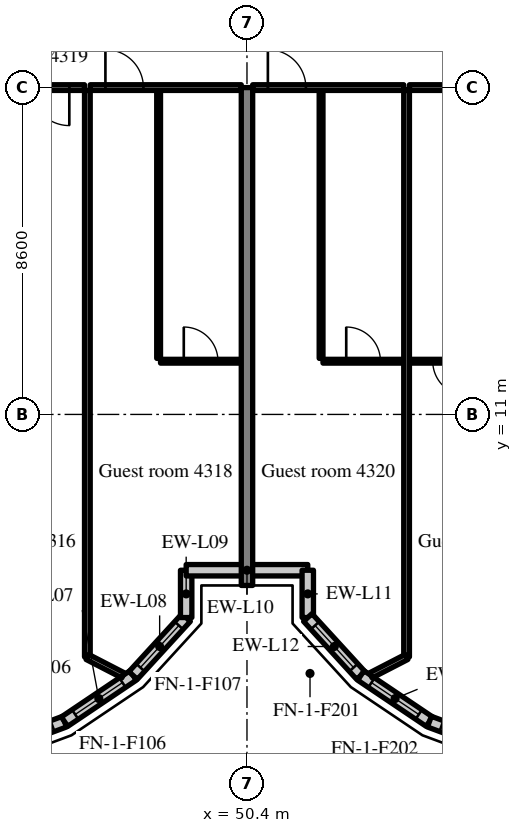
"""IFC4 building model, lengths in metres.
Left out: names, types, materials, properties, quantities, classifications, styles, units other than length and angle.
Written with IfcOpenShell. Run it as: python <this file> out.ifc"""

import sys

from ifc_helpers import new_model, si_unit, direction, frame, frame_2d, origin, place, context, subcontext, project, spatial, rectangle, extrude, source, transform, mapped, element, fill, save


model = new_model("IFC4")
c1 = context("Model", 3, precision=1e-05, world=origin(), true_north=direction((0.0, 1.0)))
c2 = subcontext(c1, "Body", "Model", "MODEL_VIEW")
j1 = project(units=[si_unit("LENGTHUNIT", "METRE"), si_unit("PLANEANGLEUNIT", "RADIAN")], contexts=[c1])
p1 = place(None, origin())
s1 = spatial("IfcSite", under=j1, at=p1, CompositionType="ELEMENT")
p2 = place(p1, origin())
s2 = spatial("IfcBuilding", under=s1, at=p2, CompositionType="ELEMENT")
p3 = place(p2, frame((0.0, 0.0, 178.2)))
s3 = spatial("IfcBuildingStorey", under=s2, at=p3, CompositionType="ELEMENT", Elevation=178.2)
m1 = source(origin(), c2, "Body", "SweptSolid", [
    extrude(rectangle(XDim=13.1, YDim=0.3, at=frame_2d((6.55, 0.0))), origin(), (0.0, 0.0, 1.0), 3.52),
])
p4 = place(p3, frame((50.4, 6.5, 0.0), z_axis=(0.0, 0.0, 1.0), x_axis=(0.0, 1.0, 0.0)))
e1 = element("IfcWall", 1, at=p4, inside=s3, PredefinedType="SHEAR", context=c2, shape_type="MappedRepresentation", body=[
    mapped(m1, transform((0.0, 0.0, 0.0), scale=1.0)),
])
m2 = source(origin(), c2, "Body", "SweptSolid", [
    extrude(rectangle(XDim=2.176, YDim=0.3, at=frame_2d((1.088, 0.0))), origin(), (0.0, 0.0, 1.0), 3.52),
])
p5 = place(p3, frame((43.56, 2.16, 0.0), z_axis=(0.0, 0.0, 1.0), x_axis=(0.937531979054, 0.347899106424, 0.0)))
e2 = element("IfcWall", 2, at=p5, inside=s3, PredefinedType="SOLIDWALL", context=c2, shape_type="MappedRepresentation", body=[
    mapped(m2, transform((0.0, 0.0, 0.0), scale=1.0)),
])
m3 = source(origin(), c2, "Body", "SweptSolid", [
    extrude(rectangle(XDim=1.5, YDim=2.0, at=frame_2d((0.75, 1.0))), frame((0.0, 0.16, 0.0), z_axis=(0.0, -1.0, 0.0), x_axis=(1.0, 0.0, 0.0)), (0.0, 0.0, 1.0), 0.32),
])
p6 = place(p5, frame((0.338, 0.0, 0.9)))
e3 = element("IfcOpeningElement", 3, at=p6, cuts=e2, PredefinedType="OPENING", context=c2, shape_type="MappedRepresentation", body=[
    mapped(m3, transform((0.0, 0.0, 0.0), scale=1.0)),
])
m4 = source(origin(), c2, "Body", "SweptSolid", [
    extrude(rectangle(XDim=2.176, YDim=0.3, at=frame_2d((1.088, 0.0))), origin(), (0.0, 0.0, 1.0), 3.52),
])
p7 = place(p3, frame((45.599, 2.917, 0.0), z_axis=(0.0, 0.0, 1.0), x_axis=(0.829625727223, 0.558319937607, 0.0)))
e4 = element("IfcWall", 4, at=p7, inside=s3, PredefinedType="SOLIDWALL", context=c2, shape_type="MappedRepresentation", body=[
    mapped(m4, transform((0.0, 0.0, 0.0), scale=1.0)),
])
p8 = place(p7, frame((0.338, 0.0, 0.9)))
e5 = element("IfcOpeningElement", 5, at=p8, cuts=e4, PredefinedType="OPENING", context=c2, shape_type="MappedRepresentation", body=[
    mapped(m3, transform((0.0, 0.0, 0.0), scale=1.0)),
])
m5 = source(origin(), c2, "Body", "SweptSolid", [
    extrude(rectangle(XDim=2.067, YDim=0.3, at=frame_2d((1.033, 0.0))), origin(), (0.0, 0.0, 1.0), 3.52),
])
p9 = place(p3, frame((47.404, 4.131, 0.0), z_axis=(0.0, 0.0, 1.0), x_axis=(0.675355439877, 0.737492393065, 0.0)))
e6 = element("IfcWall", 6, at=p9, inside=s3, PredefinedType="SOLIDWALL", context=c2, shape_type="MappedRepresentation", body=[
    mapped(m5, transform((0.0, 0.0, 0.0), scale=1.0)),
])
p10 = place(p9, frame((0.283, 0.0, 0.9)))
e7 = element("IfcOpeningElement", 7, at=p10, cuts=e6, PredefinedType="OPENING", context=c2, shape_type="MappedRepresentation", body=[
    mapped(m3, transform((0.0, 0.0, 0.0), scale=1.0)),
])
m6 = source(origin(), c2, "Body", "SweptSolid", [
    extrude(rectangle(XDim=1.244, YDim=0.3, at=frame_2d((0.622, 0.0))), origin(), (0.0, 0.0, 1.0), 3.52),
])
p11 = place(p3, frame((48.8, 5.656, 0.0), z_axis=(0.0, 0.0, 1.0), x_axis=(0.0, 1.0, 0.0)))
e8 = element("IfcWall", 8, at=p11, inside=s3, PredefinedType="SOLIDWALL", context=c2, shape_type="MappedRepresentation", body=[
    mapped(m6, transform((0.0, 0.0, 0.0), scale=1.0)),
])
m7 = source(origin(), c2, "Body", "SweptSolid", [
    extrude(rectangle(XDim=3.2, YDim=0.3, at=frame_2d((1.6, 0.0))), origin(), (0.0, 0.0, 1.0), 3.52),
])
p12 = place(p3, frame((48.8, 6.9, 0.0), z_axis=(0.0, 0.0, 1.0), x_axis=(1.0, 0.0, 0.0)))
e9 = element("IfcWall", 9, at=p12, inside=s3, PredefinedType="SOLIDWALL", context=c2, shape_type="MappedRepresentation", body=[
    mapped(m7, transform((0.0, 0.0, 0.0), scale=1.0)),
])
p13 = place(p3, frame((52.0, 6.9, 0.0), z_axis=(0.0, 0.0, 1.0), x_axis=(0.0, -1.0, 0.0)))
e10 = element("IfcWall", 10, at=p13, inside=s3, PredefinedType="SOLIDWALL", context=c2, shape_type="MappedRepresentation", body=[
    mapped(m6, transform((0.0, 0.0, 0.0), scale=1.0)),
])
p14 = place(p3, frame((52.0, 5.656, 0.0), z_axis=(0.0, 0.0, 1.0), x_axis=(0.675355439877, -0.737492393065, 0.0)))
e11 = element("IfcWall", 11, at=p14, inside=s3, PredefinedType="SOLIDWALL", context=c2, shape_type="MappedRepresentation", body=[
    mapped(m5, transform((0.0, 0.0, 0.0), scale=1.0)),
])
p15 = place(p14, frame((0.283, 0.0, 0.9)))
e12 = element("IfcOpeningElement", 12, at=p15, cuts=e11, PredefinedType="OPENING", context=c2, shape_type="MappedRepresentation", body=[
    mapped(m3, transform((0.0, 0.0, 0.0), scale=1.0)),
])
p16 = place(p3, frame((53.396, 4.131, 0.0), z_axis=(0.0, 0.0, 1.0), x_axis=(0.829590746428, -0.558371913192, 0.0)))
e13 = element("IfcWall", 13, at=p16, inside=s3, PredefinedType="SOLIDWALL", context=c2, shape_type="MappedRepresentation", body=[
    mapped(m4, transform((0.0, 0.0, 0.0), scale=1.0)),
])
p17 = place(p16, frame((0.338, 0.0, 0.9)))
e14 = element("IfcOpeningElement", 14, at=p17, cuts=e13, PredefinedType="OPENING", context=c2, shape_type="MappedRepresentation", body=[
    mapped(m3, transform((0.0, 0.0, 0.0), scale=1.0)),
])
p18 = place(p3, frame((55.201, 2.917, 0.0), z_axis=(0.0, 0.0, 1.0), x_axis=(0.93754555999, -0.347862505801, 0.0)))
e15 = element("IfcWall", 15, at=p18, inside=s3, PredefinedType="SOLIDWALL", context=c2, shape_type="MappedRepresentation", body=[
    mapped(m4, transform((0.0, 0.0, 0.0), scale=1.0)),
])
p19 = place(p18, frame((0.338, 0.0, 0.9)))
e16 = element("IfcOpeningElement", 16, at=p19, cuts=e15, PredefinedType="OPENING", context=c2, shape_type="MappedRepresentation", body=[
    mapped(m3, transform((0.0, 0.0, 0.0), scale=1.0)),
])
m8 = source(origin(), c2, "Body", "SweptSolid", [
    extrude(rectangle(XDim=3.975, YDim=0.15, at=frame_2d((1.988, 0.0))), origin(), (0.0, 0.0, 1.0), 2.82),
])
p20 = place(p3, frame((42.15, 19.6, 0.0), z_axis=(0.0, 0.0, 1.0), x_axis=(1.0, 0.0, 0.0)))
e17 = element("IfcWall", 17, at=p20, inside=s3, PredefinedType="PARTITIONING", context=c2, shape_type="MappedRepresentation", body=[
    mapped(m8, transform((0.0, 0.0, 0.0), scale=1.0)),
])
m9 = source(origin(), c2, "Body", "SweptSolid", [
    extrude(rectangle(XDim=1.0, YDim=2.1, at=frame_2d((0.5, 1.05))), frame((0.0, 0.085, 0.0), z_axis=(0.0, -1.0, 0.0), x_axis=(1.0, 0.0, 0.0)), (0.0, 0.0, 1.0), 0.17),
])
p21 = place(p20, frame((2.575, 0.0, 0.0)))
e18 = element("IfcOpeningElement", 18, at=p21, cuts=e17, PredefinedType="OPENING", context=c2, shape_type="MappedRepresentation", body=[
    mapped(m9, transform((0.0, 0.0, 0.0), scale=1.0)),
])
m10 = source(origin(), c2, "Body", "SweptSolid", [
    extrude(rectangle(XDim=7.05, YDim=0.1, at=frame_2d((3.525, 0.0))), origin(), (0.0, 0.0, 1.0), 3.52),
])
p22 = place(p3, frame((48.075, 12.475, 0.0), z_axis=(0.0, 0.0, 1.0), x_axis=(0.0, 1.0, 0.0)))
e19 = element("IfcWall", 19, at=p22, inside=s3, PredefinedType="PARTITIONING", context=c2, shape_type="MappedRepresentation", body=[
    mapped(m10, transform((0.0, 0.0, 0.0), scale=1.0)),
])
m11 = source(origin(), c2, "Body", "SweptSolid", [
    extrude(rectangle(XDim=2.125, YDim=0.1, at=frame_2d((1.062, 0.0))), origin(), (0.0, 0.0, 1.0), 3.52),
])
p23 = place(p3, frame((48.125, 12.4, 0.0), z_axis=(0.0, 0.0, 1.0), x_axis=(1.0, 0.0, 0.0)))
e20 = element("IfcWall", 20, at=p23, inside=s3, PredefinedType="PARTITIONING", context=c2, shape_type="MappedRepresentation", body=[
    mapped(m11, transform((0.0, 0.0, 0.0), scale=1.0)),
])
m12 = source(origin(), c2, "Body", "SweptSolid", [
    extrude(rectangle(XDim=0.9, YDim=2.1, at=frame_2d((0.45, 1.05))), frame((0.0, 0.06, 0.0), z_axis=(0.0, -1.0, 0.0), x_axis=(1.0, 0.0, 0.0)), (0.0, 0.0, 1.0), 0.12),
])
p24 = place(p23, frame((0.612, 0.0, 0.0)))
e21 = element("IfcOpeningElement", 21, at=p24, cuts=e20, PredefinedType="OPENING", context=c2, shape_type="MappedRepresentation", body=[
    mapped(m12, transform((0.0, 0.0, 0.0), scale=1.0)),
])
p25 = place(p3, frame((46.275, 19.6, 0.0), z_axis=(0.0, 0.0, 1.0), x_axis=(1.0, 0.0, 0.0)))
e22 = element("IfcWall", 22, at=p25, inside=s3, PredefinedType="PARTITIONING", context=c2, shape_type="MappedRepresentation", body=[
    mapped(m8, transform((0.0, 0.0, 0.0), scale=1.0)),
])
p26 = place(p25, frame((0.4, 0.0, 0.0)))
e23 = element("IfcOpeningElement", 23, at=p26, cuts=e22, PredefinedType="OPENING", context=c2, shape_type="MappedRepresentation", body=[
    mapped(m9, transform((0.0, 0.0, 0.0), scale=1.0)),
])
m13 = source(origin(), c2, "Body", "SweptSolid", [
    extrude(rectangle(XDim=14.906, YDim=0.15, at=frame_2d((7.453, 0.0))), origin(), (0.0, 0.0, 1.0), 3.52),
])
p27 = place(p3, frame((46.2, 4.619, 0.0), z_axis=(0.0, 0.0, 1.0), x_axis=(0.0, 1.0, 0.0)))
e24 = element("IfcWall", 24, at=p27, inside=s3, PredefinedType="PARTITIONING", context=c2, shape_type="MappedRepresentation", body=[
    mapped(m13, transform((0.0, 0.0, 0.0), scale=1.0)),
])
p28 = place(p3, frame((52.35, 12.475, 0.0), z_axis=(0.0, 0.0, 1.0), x_axis=(0.0, 1.0, 0.0)))
e25 = element("IfcWall", 25, at=p28, inside=s3, PredefinedType="PARTITIONING", context=c2, shape_type="MappedRepresentation", body=[
    mapped(m10, transform((0.0, 0.0, 0.0), scale=1.0)),
])
p29 = place(p3, frame((52.4, 12.4, 0.0), z_axis=(0.0, 0.0, 1.0), x_axis=(1.0, 0.0, 0.0)))
e26 = element("IfcWall", 26, at=p29, inside=s3, PredefinedType="PARTITIONING", context=c2, shape_type="MappedRepresentation", body=[
    mapped(m11, transform((0.0, 0.0, 0.0), scale=1.0)),
])
p30 = place(p29, frame((0.612, 0.0, 0.0)))
e27 = element("IfcOpeningElement", 27, at=p30, cuts=e26, PredefinedType="OPENING", context=c2, shape_type="MappedRepresentation", body=[
    mapped(m12, transform((0.0, 0.0, 0.0), scale=1.0)),
])
m14 = source(origin(), c2, "Body", "SweptSolid", [
    extrude(rectangle(XDim=3.975, YDim=0.15, at=frame_2d((1.987, 0.0))), origin(), (0.0, 0.0, 1.0), 2.82),
])
p31 = place(p3, frame((50.55, 19.6, 0.0), z_axis=(0.0, 0.0, 1.0), x_axis=(1.0, 0.0, 0.0)))
e28 = element("IfcWall", 28, at=p31, inside=s3, PredefinedType="PARTITIONING", context=c2, shape_type="MappedRepresentation", body=[
    mapped(m14, transform((0.0, 0.0, 0.0), scale=1.0)),
])
p32 = place(p31, frame((0.4, 0.0, 0.0)))
e29 = element("IfcOpeningElement", 29, at=p32, cuts=e28, PredefinedType="OPENING", context=c2, shape_type="MappedRepresentation", body=[
    mapped(m9, transform((0.0, 0.0, 0.0), scale=1.0)),
])
p33 = place(p3, frame((54.675, 12.4, 0.0), z_axis=(0.0, 0.0, 1.0), x_axis=(1.0, 0.0, 0.0)))
e30 = element("IfcWall", 30, at=p33, inside=s3, PredefinedType="PARTITIONING", context=c2, shape_type="MappedRepresentation", body=[
    mapped(m11, transform((0.0, 0.0, 0.0), scale=1.0)),
])
p34 = place(p33, frame((0.613, 0.0, 0.0)))
e31 = element("IfcOpeningElement", 31, at=p34, cuts=e30, PredefinedType="OPENING", context=c2, shape_type="MappedRepresentation", body=[
    mapped(m12, transform((0.0, 0.0, 0.0), scale=1.0)),
])
p35 = place(p3, frame((54.675, 19.6, 0.0), z_axis=(0.0, 0.0, 1.0), x_axis=(1.0, 0.0, 0.0)))
e32 = element("IfcWall", 32, at=p35, inside=s3, PredefinedType="PARTITIONING", context=c2, shape_type="MappedRepresentation", body=[
    mapped(m14, transform((0.0, 0.0, 0.0), scale=1.0)),
])
p36 = place(p35, frame((2.575, 0.0, 0.0)))
e33 = element("IfcOpeningElement", 33, at=p36, cuts=e32, PredefinedType="OPENING", context=c2, shape_type="MappedRepresentation", body=[
    mapped(m9, transform((0.0, 0.0, 0.0), scale=1.0)),
])
p37 = place(p3, frame((54.6, 4.619, 0.0), z_axis=(0.0, 0.0, 1.0), x_axis=(0.0, 1.0, 0.0)))
e34 = element("IfcWall", 34, at=p37, inside=s3, PredefinedType="PARTITIONING", context=c2, shape_type="MappedRepresentation", body=[
    mapped(m13, transform((0.0, 0.0, 0.0), scale=1.0)),
])
m15 = source(origin(), c2, "Body", "SweptSolid", [
    extrude(rectangle(XDim=1.058, YDim=0.15, at=frame_2d((0.529, 0.0))), origin(), (0.0, 0.0, 1.0), 3.52),
])
p38 = place(p3, frame((47.14, 4.134, 0.0), z_axis=(0.0, 0.0, 1.0), x_axis=(-0.888723819054, 0.458442988218, 0.0)))
e35 = element("IfcWall", 35, at=p38, inside=s3, PredefinedType="PARTITIONING", context=c2, shape_type="MappedRepresentation", body=[
    mapped(m15, transform((0.0, 0.0, 0.0), scale=1.0)),
])
m16 = source(origin(), c2, "Body", "SweptSolid", [
    extrude(rectangle(XDim=1.058, YDim=0.15, at=frame_2d((0.529, 0.0))), origin(), (0.0, 0.0, 1.0), 3.52),
])
p39 = place(p3, frame((53.66, 4.134, 0.0), z_axis=(0.0, 0.0, 1.0), x_axis=(0.888772319209, 0.458348955063, 0.0)))
e36 = element("IfcWall", 36, at=p39, inside=s3, PredefinedType="PARTITIONING", context=c2, shape_type="MappedRepresentation", body=[
    mapped(m16, transform((0.0, 0.0, 0.0), scale=1.0)),
])
m17 = source(origin(), c2, "Body", "SweptSolid", [
    extrude(rectangle(XDim=1.5, YDim=2.0, at=frame_2d((0.75, 1.0))), frame((0.0, 0.03, 0.0), z_axis=(0.0, -1.0, 0.0), x_axis=(1.0, 0.0, 0.0)), (0.0, 0.0, 1.0), 0.06),
])
p40 = place(p6, origin())
e37 = element("IfcWindow", 37, at=p40, inside=s3, PartitioningType="SINGLE_PANEL", PredefinedType="WINDOW", context=c2, shape_type="MappedRepresentation", body=[
    mapped(m17, transform((0.0, 0.0, 0.0), scale=1.0)),
])
fill(e3, e37)
p41 = place(p8, origin())
e38 = element("IfcWindow", 38, at=p41, inside=s3, PartitioningType="SINGLE_PANEL", PredefinedType="WINDOW", context=c2, shape_type="MappedRepresentation", body=[
    mapped(m17, transform((0.0, 0.0, 0.0), scale=1.0)),
])
fill(e5, e38)
p42 = place(p10, origin())
e39 = element("IfcWindow", 39, at=p42, inside=s3, PartitioningType="SINGLE_PANEL", PredefinedType="WINDOW", context=c2, shape_type="MappedRepresentation", body=[
    mapped(m17, transform((0.0, 0.0, 0.0), scale=1.0)),
])
fill(e7, e39)
p43 = place(p15, origin())
e40 = element("IfcWindow", 40, at=p43, inside=s3, PartitioningType="SINGLE_PANEL", PredefinedType="WINDOW", context=c2, shape_type="MappedRepresentation", body=[
    mapped(m17, transform((0.0, 0.0, 0.0), scale=1.0)),
])
fill(e12, e40)
p44 = place(p17, origin())
e41 = element("IfcWindow", 41, at=p44, inside=s3, PartitioningType="SINGLE_PANEL", PredefinedType="WINDOW", context=c2, shape_type="MappedRepresentation", body=[
    mapped(m17, transform((0.0, 0.0, 0.0), scale=1.0)),
])
fill(e14, e41)
p45 = place(p19, origin())
e42 = element("IfcWindow", 42, at=p45, inside=s3, PartitioningType="SINGLE_PANEL", PredefinedType="WINDOW", context=c2, shape_type="MappedRepresentation", body=[
    mapped(m17, transform((0.0, 0.0, 0.0), scale=1.0)),
])
fill(e16, e42)
m18 = source(origin(), c2, "Body", "SweptSolid", [
    extrude(rectangle(XDim=1.0, YDim=2.1, at=frame_2d((0.5, 1.05))), frame((0.0, 0.025, 0.0), z_axis=(0.0, -1.0, 0.0), x_axis=(1.0, 0.0, 0.0)), (0.0, 0.0, 1.0), 0.05),
])
p46 = place(p21, origin())
e43 = element("IfcDoor", 43, at=p46, inside=s3, OperationType="SINGLE_SWING_RIGHT", PredefinedType="DOOR", context=c2, shape_type="MappedRepresentation", body=[
    mapped(m18, transform((0.0, 0.0, 0.0), scale=1.0)),
])
fill(e18, e43)
m19 = source(origin(), c2, "Body", "SweptSolid", [
    extrude(rectangle(XDim=0.9, YDim=2.1, at=frame_2d((0.45, 1.05))), frame((0.0, 0.025, 0.0), z_axis=(0.0, -1.0, 0.0), x_axis=(1.0, 0.0, 0.0)), (0.0, 0.0, 1.0), 0.05),
])
p47 = place(p24, origin())
e44 = element("IfcDoor", 44, at=p47, inside=s3, OperationType="SINGLE_SWING_LEFT", PredefinedType="DOOR", context=c2, shape_type="MappedRepresentation", body=[
    mapped(m19, transform((0.0, 0.0, 0.0), scale=1.0)),
])
fill(e21, e44)
p48 = place(p26, origin())
e45 = element("IfcDoor", 45, at=p48, inside=s3, OperationType="SINGLE_SWING_LEFT", PredefinedType="DOOR", context=c2, shape_type="MappedRepresentation", body=[
    mapped(m18, transform((0.0, 0.0, 0.0), scale=1.0)),
])
fill(e23, e45)
p49 = place(p30, origin())
e46 = element("IfcDoor", 46, at=p49, inside=s3, OperationType="SINGLE_SWING_LEFT", PredefinedType="DOOR", context=c2, shape_type="MappedRepresentation", body=[
    mapped(m19, transform((0.0, 0.0, 0.0), scale=1.0)),
])
fill(e27, e46)
p50 = place(p32, origin())
e47 = element("IfcDoor", 47, at=p50, inside=s3, OperationType="SINGLE_SWING_LEFT", PredefinedType="DOOR", context=c2, shape_type="MappedRepresentation", body=[
    mapped(m18, transform((0.0, 0.0, 0.0), scale=1.0)),
])
fill(e29, e47)
p51 = place(p34, origin())
e48 = element("IfcDoor", 48, at=p51, inside=s3, OperationType="SINGLE_SWING_RIGHT", PredefinedType="DOOR", context=c2, shape_type="MappedRepresentation", body=[
    mapped(m19, transform((0.0, 0.0, 0.0), scale=1.0)),
])
fill(e31, e48)
save(model, sys.argv[1])
